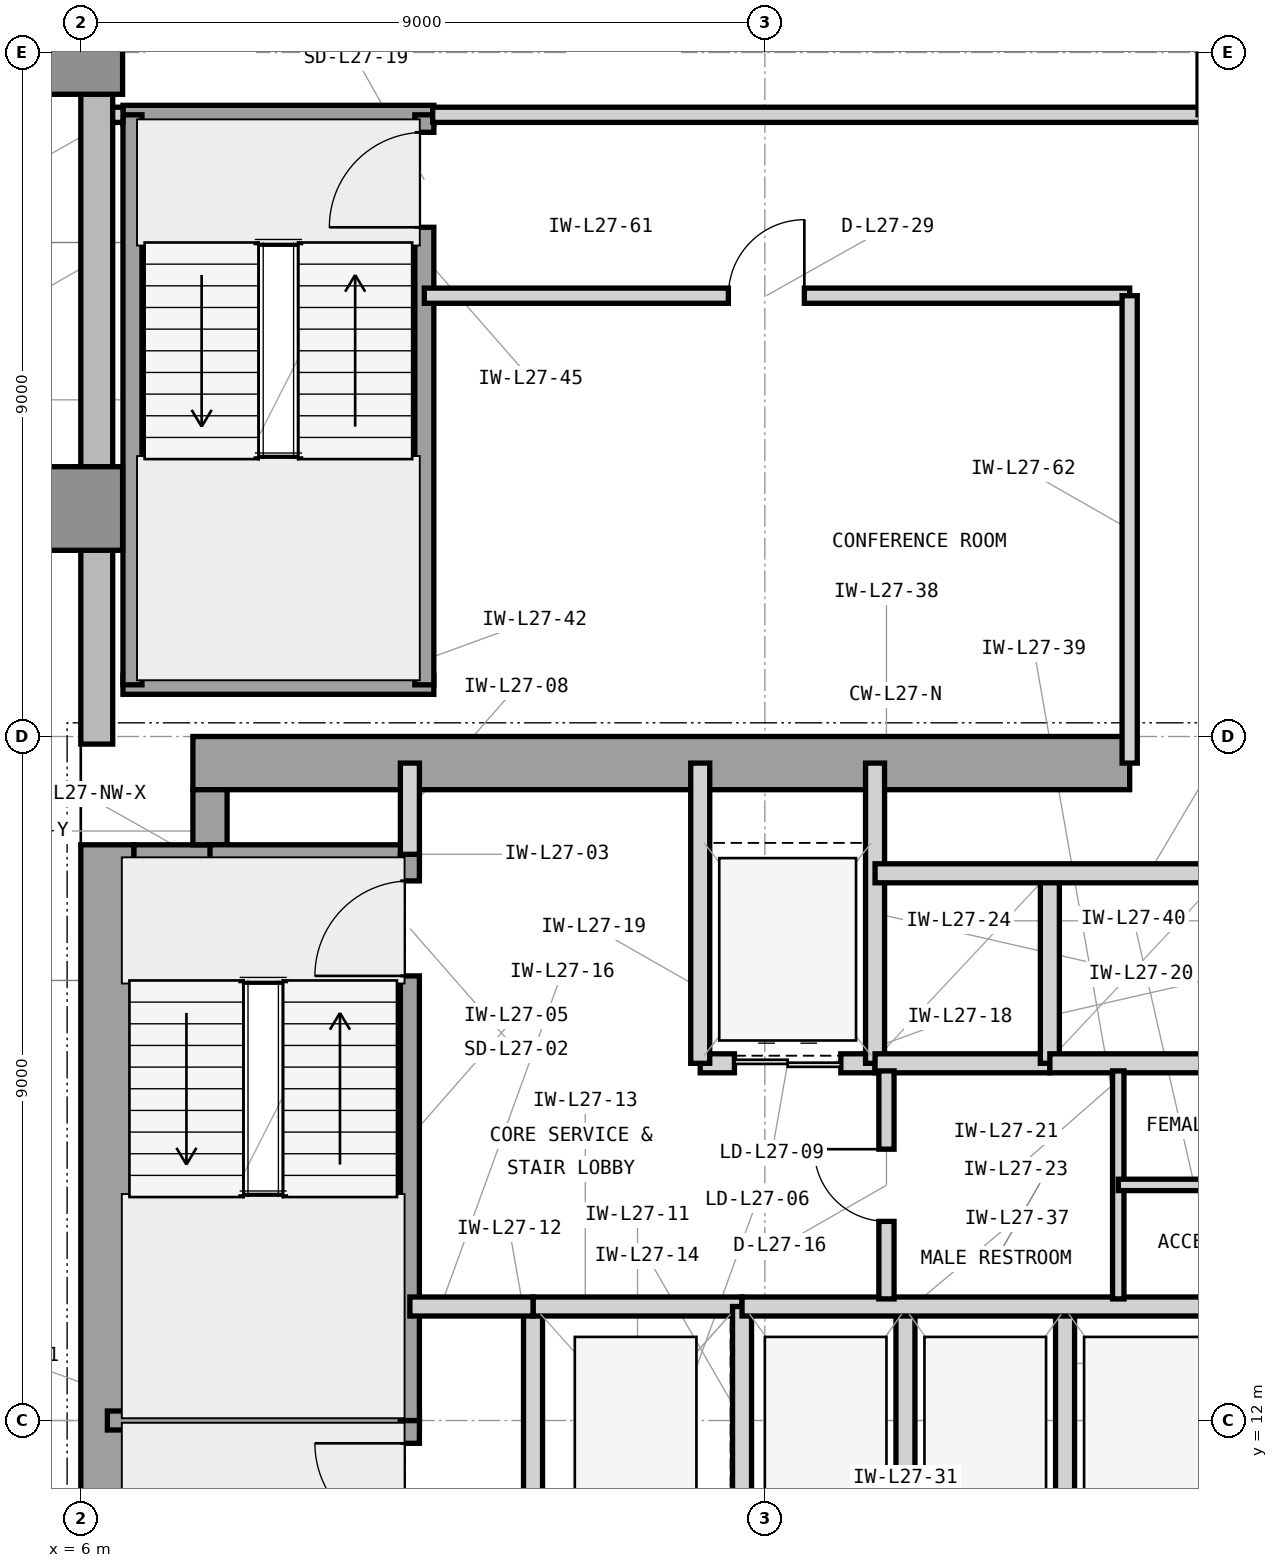
"""IFC4 building model, lengths in metres.
Left out: names, types, materials, properties, quantities, classifications, styles, units other than length and angle.
Written with IfcOpenShell. Run it as: python <this file> out.ifc"""

import sys

from ifc_helpers import new_model, si_unit, direction, frame, frame_2d, origin, origin_2d, place, context, subcontext, project, spatial, rectangle, extrude, element, fill, save


model = new_model("IFC4")
c1 = context("Model", 3, precision=1e-05, world=origin(), true_north=direction((0.0, 1.0)))
c2 = subcontext(c1, "Body", "Model", "MODEL_VIEW")
j1 = project(units=[si_unit("LENGTHUNIT", "METRE"), si_unit("PLANEANGLEUNIT", "RADIAN")], contexts=[c1])
p1 = place(None, origin())
s1 = spatial("IfcSite", under=j1, at=p1, CompositionType="ELEMENT")
p2 = place(p1, origin())
s2 = spatial("IfcBuilding", under=s1, at=p2, CompositionType="ELEMENT")
p3 = place(p2, frame((0.0, 0.0, 116.7)))
s3 = spatial("IfcBuildingStorey", under=s2, at=p3, CompositionType="ELEMENT", Elevation=116.7)
p4 = place(p3, frame((6.35, 4.425, 0.0), z_axis=(0.0, 0.0, 1.0), x_axis=(0.0, 1.0, 0.0)))
e1 = element("IfcWall", 1, at=p4, inside=s3, PredefinedType="SHEAR", context=c2, shape_type="SweptSolid", body=[
    extrude(rectangle(XDim=15.15, YDim=0.7, at=frame_2d((7.575, 0.0))), origin(), (0.0, 0.0, 1.0), 3.9),
])
p5 = place(p3, frame((7.475, 20.65, 0.0), z_axis=(0.0, 0.0, 1.0), x_axis=(1.0, 0.0, 0.0)))
e2 = element("IfcWall", 2, at=p5, inside=s3, PredefinedType="SHEAR", context=c2, shape_type="SweptSolid", body=[
    extrude(rectangle(XDim=12.325, YDim=0.7, at=frame_2d((6.163, 0.0))), origin(), (0.0, 0.0, 1.0), 3.9),
])
p6 = place(p3, frame((6.7, 19.35, 0.0), z_axis=(0.0, 0.0, 1.0), x_axis=(1.0, 0.0, 0.0)))
e3 = element("IfcWall", 3, at=p6, inside=s3, PredefinedType="SHEAR", context=c2, shape_type="SweptSolid", body=[
    extrude(rectangle(XDim=1.225, YDim=0.45, at=frame_2d((0.613, 0.0))), origin(), (0.0, 0.0, 1.0), 3.9),
])
p7 = place(p3, frame((7.7, 19.575, 0.0), z_axis=(0.0, 0.0, 1.0), x_axis=(0.0, 1.0, 0.0)))
e4 = element("IfcWall", 4, at=p7, inside=s3, PredefinedType="SHEAR", context=c2, shape_type="SweptSolid", body=[
    extrude(rectangle(XDim=0.725, YDim=0.45, at=frame_2d((0.363, 0.0))), origin(), (0.0, 0.0, 1.0), 3.9),
])
for number, where, z_axis, x_axis in (
    (5, (6.0, 24.0, 0.0), (0.0, 0.0, 1.0), (1.0, 0.0, 0.0)),
    (6, (6.0, 30.0, 0.0), (0.0, 0.0, 1.0), (1.0, 0.0, 0.0)),
):
    element("IfcColumn", number, at=place(p3, frame(where, z_axis=z_axis, x_axis=x_axis)), inside=s3, PredefinedType="COLUMN", context=c2, shape_type="SweptSolid", body=[
        extrude(rectangle(XDim=1.1, YDim=1.1, at=origin_2d()), origin(), (0.0, 0.0, 1.0), 3.9),
    ])
p8 = place(p3, frame((6.21, 46.4, 0.0), z_axis=(0.0, 0.0, 1.0), x_axis=(0.0, -1.0, 0.0)))
e7 = element("IfcWall", 7, at=p8, inside=s3, PredefinedType="STANDARD", context=c2, shape_type="SweptSolid", body=[
    extrude(rectangle(XDim=25.5, YDim=0.42, at=frame_2d((12.75, 0.0))), origin(), (0.0, 0.0, 1.0), 3.7),
])
p9 = place(p8, frame((11.5, 0.0, 0.85)))
e8 = element("IfcOpeningElement", 8, at=p9, cuts=e7, PredefinedType="OPENING", context=c2, shape_type="SweptSolid", body=[
    extrude(rectangle(XDim=2.5, YDim=2.25, at=frame_2d((1.25, 1.125))), frame((0.0, 0.22, 0.0), z_axis=(0.0, -1.0, 0.0), x_axis=(1.0, 0.0, 0.0)), (0.0, 0.0, 1.0), 0.44),
])
p10 = place(p8, frame((8.336, 0.0, 0.85)))
e9 = element("IfcOpeningElement", 9, at=p10, cuts=e7, PredefinedType="OPENING", context=c2, shape_type="SweptSolid", body=[
    extrude(rectangle(XDim=1.2, YDim=2.25, at=frame_2d((0.6, 1.125))), frame((0.0, 0.22, 0.0), z_axis=(0.0, -1.0, 0.0), x_axis=(1.0, 0.0, 0.0)), (0.0, 0.0, 1.0), 0.44),
])
p11 = place(p3, frame((6.35, 12.0, 0.0), z_axis=(0.0, 0.0, 1.0), x_axis=(1.0, 0.0, 0.0)))
e10 = element("IfcWall", 10, at=p11, inside=s3, PredefinedType="SHEAR", context=c2, shape_type="SweptSolid", body=[
    extrude(rectangle(XDim=4.105, YDim=0.25, at=frame_2d((2.052, 0.0))), origin(), (0.0, 0.0, 1.0), 3.9),
])
p12 = place(p3, frame((7.7, 19.45, 0.0), z_axis=(0.0, 0.0, 1.0), x_axis=(1.0, 0.0, 0.0)))
e11 = element("IfcWall", 11, at=p12, inside=s3, PredefinedType="SHEAR", context=c2, shape_type="SweptSolid", body=[
    extrude(rectangle(XDim=2.755, YDim=0.25, at=frame_2d((1.377, 0.0))), origin(), (0.0, 0.0, 1.0), 3.9),
])
p13 = place(p3, frame((10.33, 4.55, 0.0), z_axis=(0.0, 0.0, 1.0), x_axis=(0.0, 1.0, 0.0)))
e12 = element("IfcWall", 12, at=p13, inside=s3, PredefinedType="SHEAR", context=c2, shape_type="SweptSolid", body=[
    extrude(rectangle(XDim=7.45, YDim=0.25, at=frame_2d((3.725, 0.0))), origin(), (0.0, 0.0, 1.0), 3.9),
])
p14 = place(p13, frame((5.9, 0.0, 0.0)))
e13 = element("IfcOpeningElement", 13, at=p14, cuts=e12, PredefinedType="OPENING", context=c2, shape_type="SweptSolid", body=[
    extrude(rectangle(XDim=1.25, YDim=2.2, at=frame_2d((0.625, 1.1))), frame((0.0, 0.135, 0.0), z_axis=(0.0, -1.0, 0.0), x_axis=(1.0, 0.0, 0.0)), (0.0, 0.0, 1.0), 0.27),
])
p15 = place(p3, frame((10.33, 12.0, 0.0), z_axis=(0.0, 0.0, 1.0), x_axis=(0.0, 1.0, 0.0)))
e14 = element("IfcWall", 14, at=p15, inside=s3, PredefinedType="SHEAR", context=c2, shape_type="SweptSolid", body=[
    extrude(rectangle(XDim=7.45, YDim=0.25, at=frame_2d((3.725, 0.0))), origin(), (0.0, 0.0, 1.0), 3.9),
])
p16 = place(p15, frame((5.85, 0.0, 0.0)))
e15 = element("IfcOpeningElement", 15, at=p16, cuts=e14, PredefinedType="OPENING", context=c2, shape_type="SweptSolid", body=[
    extrude(rectangle(XDim=1.25, YDim=2.2, at=frame_2d((0.625, 1.1))), frame((0.0, 0.135, 0.0), z_axis=(0.0, -1.0, 0.0), x_axis=(1.0, 0.0, 0.0)), (0.0, 0.0, 1.0), 0.27),
])
p17 = place(p3, frame((10.33, 19.45, 0.0), z_axis=(0.0, 0.0, 1.0), x_axis=(0.0, 1.0, 0.0)))
e16 = element("IfcWall", 16, at=p17, inside=s3, PredefinedType="PARTITIONING", context=c2, shape_type="SweptSolid", body=[
    extrude(rectangle(XDim=1.2, YDim=0.25, at=frame_2d((0.6, 0.0))), origin(), (0.0, 0.0, 1.0), 2.917),
])
p18 = place(p3, frame((11.95, 10.5, 0.0), z_axis=(0.0, 0.0, 1.0), x_axis=(0.0, 1.0, 0.0)))
e17 = element("IfcWall", 17, at=p18, inside=s3, PredefinedType="PARTITIONING", context=c2, shape_type="SweptSolid", body=[
    extrude(rectangle(XDim=3.0, YDim=0.25, at=frame_2d((1.5, 0.0))), origin(), (0.0, 0.0, 1.0), 3.69),
])
p19 = place(p3, frame((11.95, 13.5, 0.0), z_axis=(0.0, 0.0, 1.0), x_axis=(1.0, 0.0, 0.0)))
e18 = element("IfcWall", 18, at=p19, inside=s3, PredefinedType="PARTITIONING", context=c2, shape_type="SweptSolid", body=[
    extrude(rectangle(XDim=2.75, YDim=0.25, at=frame_2d((1.375, 0.0))), origin(), (0.0, 0.0, 1.0), 3.227),
])
p20 = place(p3, frame((14.7, 10.5, 0.0), z_axis=(0.0, 0.0, 1.0), x_axis=(0.0, 1.0, 0.0)))
e19 = element("IfcWall", 19, at=p20, inside=s3, PredefinedType="PARTITIONING", context=c2, shape_type="SweptSolid", body=[
    extrude(rectangle(XDim=3.0, YDim=0.25, at=frame_2d((1.5, 0.0))), origin(), (0.0, 0.0, 1.0), 3.69),
])
p21 = place(p3, frame((10.33, 13.5, 0.0), z_axis=(0.0, 0.0, 1.0), x_axis=(1.0, 0.0, 0.0)))
e20 = element("IfcWall", 20, at=p21, inside=s3, PredefinedType="PARTITIONING", context=c2, shape_type="SweptSolid", body=[
    extrude(rectangle(XDim=1.62, YDim=0.25, at=frame_2d((0.81, 0.0))), origin(), (0.0, 0.0, 1.0), 3.227),
])
p22 = place(p3, frame((14.15, 16.7, 0.0), z_axis=(0.0, 0.0, 1.0), x_axis=(1.0, 0.0, 0.0)))
e21 = element("IfcWall", 21, at=p22, inside=s3, PredefinedType="PARTITIONING", context=c2, shape_type="SweptSolid", body=[
    extrude(rectangle(XDim=2.3, YDim=0.25, at=frame_2d((1.15, 0.0))), origin(), (0.0, 0.0, 1.0), 3.227),
])
p23 = place(p22, frame((0.45, 0.0, 0.0)))
e22 = element("IfcOpeningElement", 22, at=p23, cuts=e21, PredefinedType="OPENING", context=c2, shape_type="SweptSolid", body=[
    extrude(rectangle(XDim=1.4, YDim=2.35, at=frame_2d((0.7, 1.175))), frame((0.0, 0.135, 0.0), z_axis=(0.0, -1.0, 0.0), x_axis=(1.0, 0.0, 0.0)), (0.0, 0.0, 1.0), 0.27),
])
for number, where, z_axis, x_axis in (
    (23, (14.15, 16.7, 0.0), (0.0, 0.0, 1.0), (0.0, 1.0, 0.0)),
    (24, (16.45, 16.7, 0.0), (0.0, 0.0, 1.0), (0.0, 1.0, 0.0)),
):
    element("IfcWall", number, at=place(p3, frame(where, z_axis=z_axis, x_axis=x_axis)), inside=s3, PredefinedType="PARTITIONING", context=c2, shape_type="SweptSolid", body=[
        extrude(rectangle(XDim=3.95, YDim=0.25, at=frame_2d((1.975, 0.0))), origin(), (0.0, 0.0, 1.0), 3.69),
    ])
p24 = place(p3, frame((16.45, 16.7, 0.0), z_axis=(0.0, 0.0, 1.0), x_axis=(1.0, 0.0, 0.0)))
e25 = element("IfcWall", 25, at=p24, inside=s3, PredefinedType="PARTITIONING", context=c2, shape_type="SweptSolid", body=[
    extrude(rectangle(XDim=2.3, YDim=0.25, at=frame_2d((1.15, 0.0))), origin(), (0.0, 0.0, 1.0), 3.227),
])
p25 = place(p3, frame((18.75, 16.7, 0.0), z_axis=(0.0, 0.0, 1.0), x_axis=(0.0, 1.0, 0.0)))
e26 = element("IfcWall", 26, at=p25, inside=s3, PredefinedType="PARTITIONING", context=c2, shape_type="SweptSolid", body=[
    extrude(rectangle(XDim=2.5, YDim=0.25, at=frame_2d((1.25, 0.0))), origin(), (0.0, 0.0, 1.0), 3.69),
])
p26 = place(p3, frame((18.75, 16.7, 0.0), z_axis=(0.0, 0.0, 1.0), x_axis=(1.0, 0.0, 0.0)))
e27 = element("IfcWall", 27, at=p26, inside=s3, PredefinedType="PARTITIONING", context=c2, shape_type="SweptSolid", body=[
    extrude(rectangle(XDim=2.3, YDim=0.25, at=frame_2d((1.15, 0.0))), origin(), (0.0, 0.0, 1.0), 3.227),
])
p27 = place(p3, frame((16.45, 19.2, 0.0), z_axis=(0.0, 0.0, 1.0), x_axis=(1.0, 0.0, 0.0)))
e28 = element("IfcWall", 28, at=p27, inside=s3, PredefinedType="PARTITIONING", context=c2, shape_type="SweptSolid", body=[
    extrude(rectangle(XDim=7.2, YDim=0.25, at=frame_2d((3.6, 0.0))), origin(), (0.0, 0.0, 1.0), 3.69),
])
for number, where, z_axis, x_axis in (
    (29, (16.85, 10.5, 0.0), (0.0, 0.0, 1.0), (0.0, 1.0, 0.0)),
    (30, (18.95, 10.5, 0.0), (0.0, 0.0, 1.0), (0.0, 1.0, 0.0)),
):
    element("IfcWall", number, at=place(p3, frame(where, z_axis=z_axis, x_axis=x_axis)), inside=s3, PredefinedType="PARTITIONING", context=c2, shape_type="SweptSolid", body=[
        extrude(rectangle(XDim=3.0, YDim=0.25, at=frame_2d((1.5, 0.0))), origin(), (0.0, 0.0, 1.0), 3.69),
    ])
p28 = place(p3, frame((14.7, 13.5, 0.0), z_axis=(0.0, 0.0, 1.0), x_axis=(1.0, 0.0, 0.0)))
e31 = element("IfcWall", 31, at=p28, inside=s3, PredefinedType="PARTITIONING", context=c2, shape_type="SweptSolid", body=[
    extrude(rectangle(XDim=8.95, YDim=0.25, at=frame_2d((4.475, 0.0))), origin(), (0.0, 0.0, 1.0), 3.227),
])
p29 = place(p3, frame((16.6, 13.6, 0.0), z_axis=(0.0, 0.0, 1.0), x_axis=(0.0, 1.0, 0.0)))
e32 = element("IfcWall", 32, at=p29, inside=s3, PredefinedType="PARTITIONING", context=c2, shape_type="SweptSolid", body=[
    extrude(rectangle(XDim=3.0, YDim=0.2, at=frame_2d((1.5, 0.0))), origin(), (0.0, 0.0, 1.0), 3.69),
])
p30 = place(p29, frame((1.02, 0.0, 0.0)))
e33 = element("IfcOpeningElement", 33, at=p30, cuts=e32, PredefinedType="OPENING", context=c2, shape_type="SweptSolid", body=[
    extrude(rectangle(XDim=0.95, YDim=2.1, at=frame_2d((0.475, 1.05))), frame((0.0, 0.11, 0.0), z_axis=(0.0, -1.0, 0.0), x_axis=(1.0, 0.0, 0.0)), (0.0, 0.0, 1.0), 0.22),
])
p31 = place(p3, frame((19.65, 13.6, 0.0), z_axis=(0.0, 0.0, 1.0), x_axis=(0.0, 1.0, 0.0)))
e34 = element("IfcWall", 34, at=p31, inside=s3, PredefinedType="PARTITIONING", context=c2, shape_type="SweptSolid", body=[
    extrude(rectangle(XDim=3.0, YDim=0.15, at=frame_2d((1.5, 0.0))), origin(), (0.0, 0.0, 1.0), 3.69),
])
p32 = place(p3, frame((19.65, 15.1, 0.0), z_axis=(0.0, 0.0, 1.0), x_axis=(1.0, 0.0, 0.0)))
e35 = element("IfcWall", 35, at=p32, inside=s3, PredefinedType="PARTITIONING", context=c2, shape_type="SweptSolid", body=[
    extrude(rectangle(XDim=4.0, YDim=0.15, at=frame_2d((2.0, 0.0))), origin(), (0.0, 0.0, 1.0), 3.69),
])
for number, where, z_axis, x_axis in (
    (36, (6.555, 21.68, 0.0), (0.0, 0.0, 1.0), (1.0, 0.0, 0.0)),
    (37, (6.555, 29.18, 0.0), (0.0, 0.0, 1.0), (1.0, 0.0, 0.0)),
):
    element("IfcWall", number, at=place(p3, frame(where, z_axis=z_axis, x_axis=x_axis)), inside=s3, PredefinedType="SHEAR", context=c2, shape_type="SweptSolid", body=[
        extrude(rectangle(XDim=4.09, YDim=0.25, at=frame_2d((2.045, 0.0))), origin(), (0.0, 0.0, 1.0), 3.9),
    ])
p33 = place(p3, frame((6.68, 21.68, 0.0), z_axis=(0.0, 0.0, 1.0), x_axis=(0.0, 1.0, 0.0)))
e38 = element("IfcWall", 38, at=p33, inside=s3, PredefinedType="SHEAR", context=c2, shape_type="SweptSolid", body=[
    extrude(rectangle(XDim=7.5, YDim=0.25, at=frame_2d((3.75, 0.0))), origin(), (0.0, 0.0, 1.0), 3.9),
])
p34 = place(p3, frame((10.52, 21.68, 0.0), z_axis=(0.0, 0.0, 1.0), x_axis=(0.0, 1.0, 0.0)))
e39 = element("IfcWall", 39, at=p34, inside=s3, PredefinedType="SHEAR", context=c2, shape_type="SweptSolid", body=[
    extrude(rectangle(XDim=7.5, YDim=0.25, at=frame_2d((3.75, 0.0))), origin(), (0.0, 0.0, 1.0), 3.9),
])
p35 = place(p34, frame((6.02, 0.0, 0.0)))
e40 = element("IfcOpeningElement", 40, at=p35, cuts=e39, PredefinedType="OPENING", context=c2, shape_type="SweptSolid", body=[
    extrude(rectangle(XDim=1.25, YDim=2.2, at=frame_2d((0.625, 1.1))), frame((0.0, 0.135, 0.0), z_axis=(0.0, -1.0, 0.0), x_axis=(1.0, 0.0, 0.0)), (0.0, 0.0, 1.0), 0.27),
])
p36 = place(p3, frame((10.52, 26.8, 0.0), z_axis=(0.0, 0.0, 1.0), x_axis=(1.0, 0.0, 0.0)))
e41 = element("IfcWall", 41, at=p36, inside=s3, PredefinedType="PARTITIONING", context=c2, shape_type="SweptSolid", body=[
    extrude(rectangle(XDim=9.28, YDim=0.2, at=frame_2d((4.64, 0.0))), origin(), (0.0, 0.0, 1.0), 3.69),
])
p37 = place(p36, frame((4.0, 0.0, 0.0)))
e42 = element("IfcOpeningElement", 42, at=p37, cuts=e41, PredefinedType="OPENING", context=c2, shape_type="SweptSolid", body=[
    extrude(rectangle(XDim=1.0, YDim=2.15, at=frame_2d((0.5, 1.075))), frame((0.0, 0.11, 0.0), z_axis=(0.0, -1.0, 0.0), x_axis=(1.0, 0.0, 0.0)), (0.0, 0.0, 1.0), 0.22),
])
p38 = place(p3, frame((19.8, 20.65, 0.0), z_axis=(0.0, 0.0, 1.0), x_axis=(0.0, 1.0, 0.0)))
e43 = element("IfcWall", 43, at=p38, inside=s3, PredefinedType="PARTITIONING", context=c2, shape_type="SweptSolid", body=[
    extrude(rectangle(XDim=6.15, YDim=0.2, at=frame_2d((3.075, 0.0))), origin(), (0.0, 0.0, 1.0), 3.69),
])
p39 = place(p3, frame((6.42, 29.18, 0.0), z_axis=(0.0, 0.0, 1.0), x_axis=(1.0, 0.0, 0.0)))
e44 = element("IfcWall", 44, at=p39, inside=s3, PredefinedType="PARTITIONING", context=c2, shape_type="SweptSolid", body=[
    extrude(rectangle(XDim=0.135, YDim=0.2, at=frame_2d((0.067, 0.0))), origin(), (0.0, 0.0, 1.0), 3.69),
])
p40 = place(p3, frame((10.63, 29.18, 0.0), z_axis=(0.0, 0.0, 1.0), x_axis=(1.0, 0.0, 0.0)))
e45 = element("IfcWall", 45, at=p40, inside=s3, PredefinedType="PARTITIONING", context=c2, shape_type="SweptSolid", body=[
    extrude(rectangle(XDim=10.17, YDim=0.2, at=frame_2d((5.085, 0.0))), origin(), (0.0, 0.0, 1.0), 3.69),
])
p41 = place(p14, origin())
e46 = element("IfcDoor", 46, at=p41, inside=s3, OperationType="SINGLE_SWING_RIGHT", PredefinedType="DOOR", context=c2, shape_type="SweptSolid", body=[
    extrude(rectangle(XDim=1.25, YDim=2.2, at=frame_2d((0.625, 1.1))), frame((0.0, 0.025, 0.0), z_axis=(0.0, -1.0, 0.0), x_axis=(1.0, 0.0, 0.0)), (0.0, 0.0, 1.0), 0.05),
])
fill(e13, e46)
p42 = place(p16, origin())
e47 = element("IfcDoor", 47, at=p42, inside=s3, OperationType="SINGLE_SWING_LEFT", PredefinedType="DOOR", context=c2, shape_type="SweptSolid", body=[
    extrude(rectangle(XDim=1.25, YDim=2.2, at=frame_2d((0.625, 1.1))), frame((0.0, 0.025, 0.0), z_axis=(0.0, -1.0, 0.0), x_axis=(1.0, 0.0, 0.0)), (0.0, 0.0, 1.0), 0.05),
])
fill(e15, e47)
p43 = place(p23, origin())
e48 = element("IfcDoor", 48, at=p43, inside=s3, OperationType="DOUBLE_DOOR_SLIDING", PredefinedType="DOOR", context=c2, shape_type="SweptSolid", body=[
    extrude(rectangle(XDim=1.4, YDim=2.35, at=frame_2d((0.7, 1.175))), frame((0.0, 0.025, 0.0), z_axis=(0.0, -1.0, 0.0), x_axis=(1.0, 0.0, 0.0)), (0.0, 0.0, 1.0), 0.05),
])
fill(e22, e48)
p44 = place(p30, origin())
e49 = element("IfcDoor", 49, at=p44, inside=s3, OperationType="SINGLE_SWING_RIGHT", PredefinedType="DOOR", context=c2, shape_type="SweptSolid", body=[
    extrude(rectangle(XDim=0.95, YDim=2.1, at=frame_2d((0.475, 1.05))), frame((0.0, 0.025, 0.0), z_axis=(0.0, -1.0, 0.0), x_axis=(1.0, 0.0, 0.0)), (0.0, 0.0, 1.0), 0.05),
])
fill(e33, e49)
p45 = place(p35, origin())
e50 = element("IfcDoor", 50, at=p45, inside=s3, OperationType="SINGLE_SWING_LEFT", PredefinedType="DOOR", context=c2, shape_type="SweptSolid", body=[
    extrude(rectangle(XDim=1.25, YDim=2.2, at=frame_2d((0.625, 1.1))), frame((0.0, 0.025, 0.0), z_axis=(0.0, -1.0, 0.0), x_axis=(1.0, 0.0, 0.0)), (0.0, 0.0, 1.0), 0.05),
])
fill(e40, e50)
p46 = place(p37, origin())
e51 = element("IfcDoor", 51, at=p46, inside=s3, OperationType="SINGLE_SWING_RIGHT", PredefinedType="DOOR", context=c2, shape_type="SweptSolid", body=[
    extrude(rectangle(XDim=1.0, YDim=2.15, at=frame_2d((0.5, 1.075))), frame((0.0, 0.025, 0.0), z_axis=(0.0, -1.0, 0.0), x_axis=(1.0, 0.0, 0.0)), (0.0, 0.0, 1.0), 0.05),
])
fill(e42, e51)
save(model, sys.argv[1])
